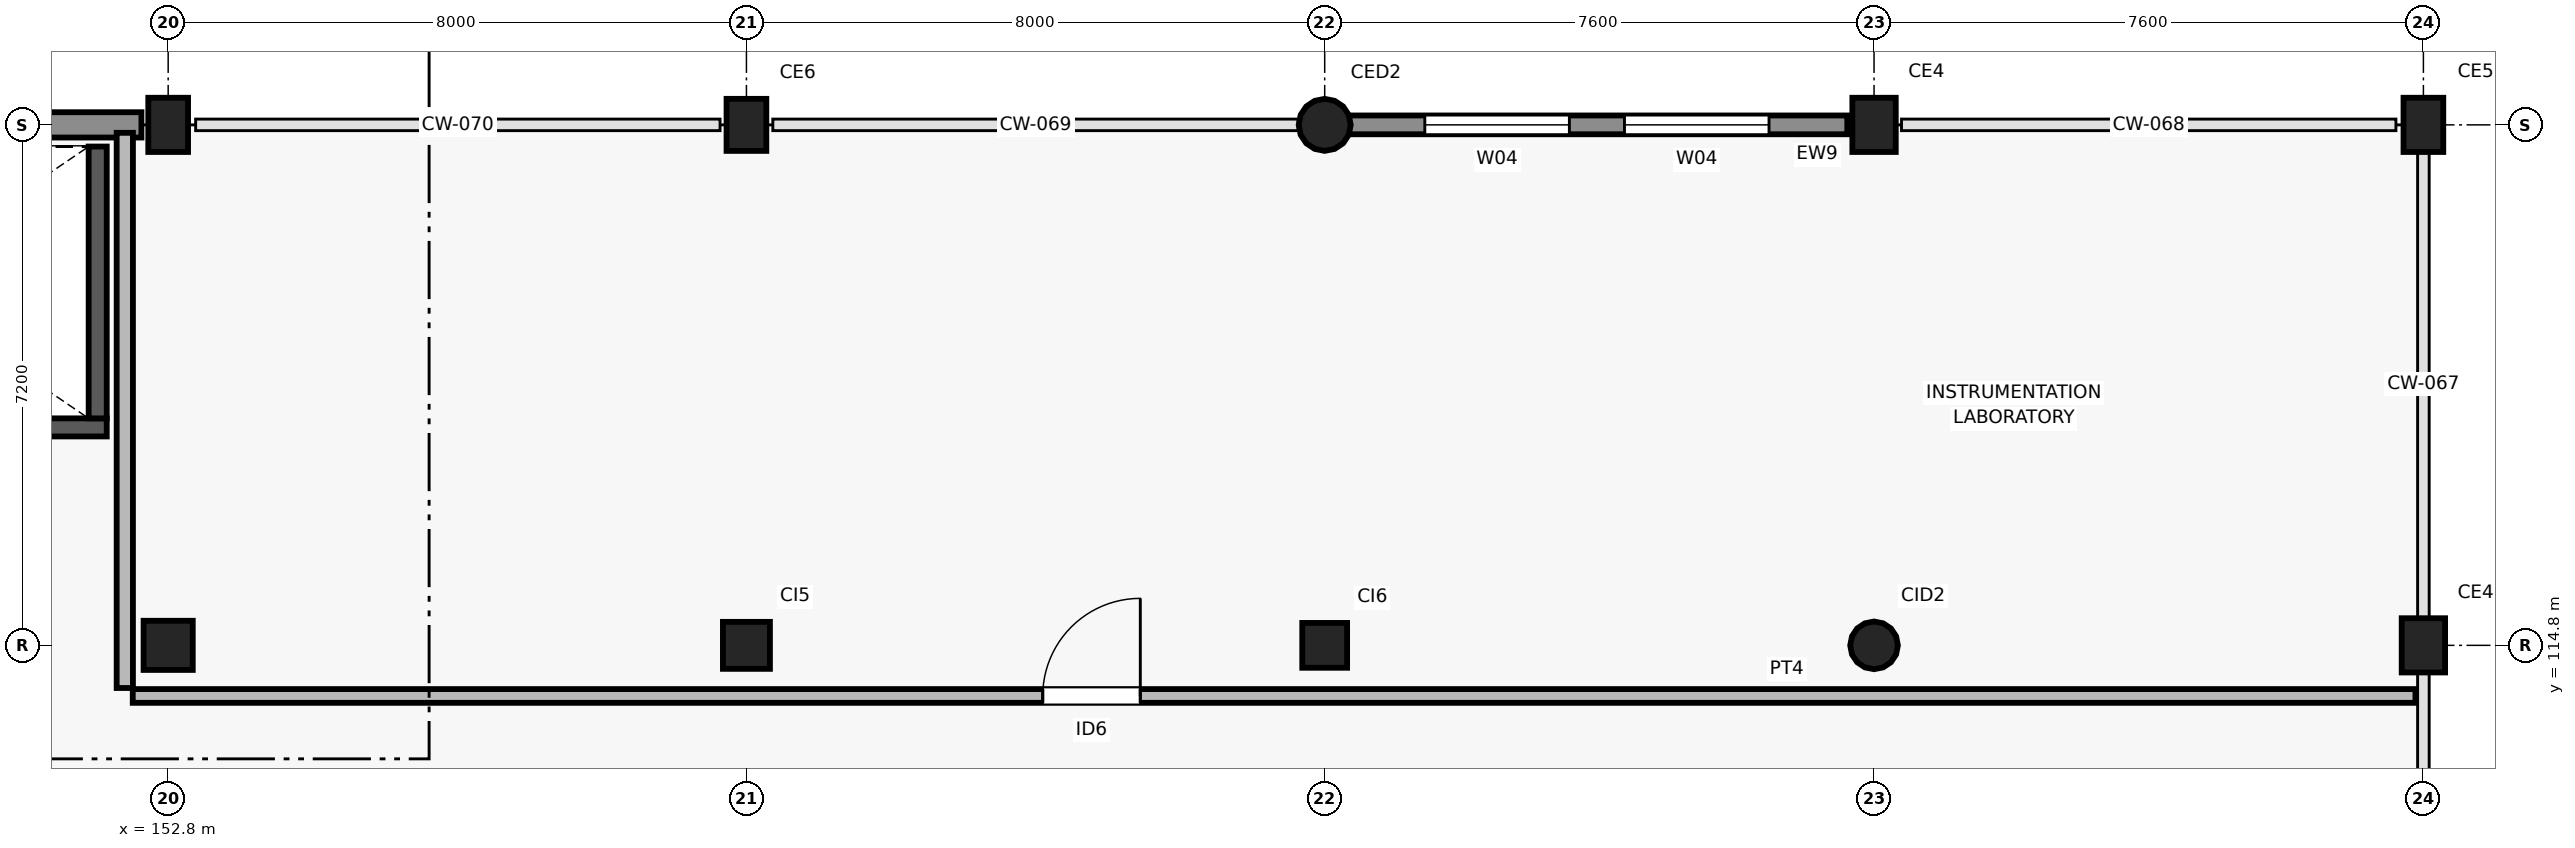
"""IFC4 building model, lengths in metres.
Left out: names, types, materials, properties, quantities, classifications, styles, units other than length and angle.
Written with IfcOpenShell. Run it as: python <this file> out.ifc"""

import sys

from ifc_helpers import new_model, si_unit, direction, frame, frame_2d, origin, origin_2d, place, context, subcontext, project, spatial, rectangle, circle, extrude, element, fill, save


model = new_model("IFC4")
c1 = context("Model", 3, precision=1e-05, world=origin(), true_north=direction((0.0, 1.0)))
c2 = subcontext(c1, "Body", "Model", "MODEL_VIEW")
j1 = project(units=[si_unit("LENGTHUNIT", "METRE"), si_unit("PLANEANGLEUNIT", "RADIAN")], contexts=[c1])
p1 = place(None, origin())
s1 = spatial("IfcSite", under=j1, at=p1, CompositionType="ELEMENT")
p2 = place(p1, origin())
s2 = spatial("IfcBuilding", under=s1, at=p2, CompositionType="ELEMENT")
p3 = place(p2, frame((0.0, 0.0, 4.5)))
s3 = spatial("IfcBuildingStorey", under=s2, at=p3, CompositionType="ELEMENT", Elevation=4.5)
p4 = place(p3, frame((152.8, 114.8, 0.0), z_axis=(0.0, 0.0, 1.0), x_axis=(1.0, 0.0, 0.0)))
e1 = element("IfcColumn", 1, at=p4, inside=s3, PredefinedType="COLUMN", context=c2, shape_type="SweptSolid", body=[
    extrude(rectangle(XDim=0.68, YDim=0.68, at=origin_2d()), origin(), (0.0, 0.0, 1.0), 4.5),
])
p5 = place(p3, frame((152.8, 122.0, 0.0), z_axis=(0.0, 0.0, 1.0), x_axis=(1.0, 0.0, 0.0)))
e2 = element("IfcColumn", 2, at=p5, inside=s3, PredefinedType="COLUMN", context=c2, shape_type="SweptSolid", body=[
    extrude(rectangle(XDim=0.75, YDim=0.55, at=origin_2d()), origin(), (0.0, 0.0, 1.0), 4.5),
])
p6 = place(p3, frame((160.8, 114.8, 0.0), z_axis=(0.0, 0.0, 1.0), x_axis=(1.0, 0.0, 0.0)))
e3 = element("IfcColumn", 3, at=p6, inside=s3, PredefinedType="COLUMN", context=c2, shape_type="SweptSolid", body=[
    extrude(rectangle(XDim=0.65, YDim=0.65, at=origin_2d()), origin(), (0.0, 0.0, 1.0), 4.5),
])
p7 = place(p3, frame((160.8, 122.0, 0.0), z_axis=(0.0, 0.0, 1.0), x_axis=(1.0, 0.0, 0.0)))
e4 = element("IfcColumn", 4, at=p7, inside=s3, PredefinedType="COLUMN", context=c2, shape_type="SweptSolid", body=[
    extrude(rectangle(XDim=0.72, YDim=0.55, at=origin_2d()), origin(), (0.0, 0.0, 1.0), 4.5),
])
p8 = place(p3, frame((168.8, 114.8, 0.0), z_axis=(0.0, 0.0, 1.0), x_axis=(1.0, 0.0, 0.0)))
e5 = element("IfcColumn", 5, at=p8, inside=s3, PredefinedType="COLUMN", context=c2, shape_type="SweptSolid", body=[
    extrude(rectangle(XDim=0.62, YDim=0.62, at=origin_2d()), origin(), (0.0, 0.0, 1.0), 4.5),
])
p9 = place(p3, frame((168.8, 122.0, 0.0), z_axis=(0.0, 0.0, 1.0), x_axis=(1.0, 0.0, 0.0)))
e6 = element("IfcColumn", 6, at=p9, inside=s3, PredefinedType="COLUMN", context=c2, shape_type="SweptSolid", body=[
    extrude(circle(Radius=0.36, at=origin_2d()), origin(), (0.0, 0.0, 1.0), 4.5),
])
p10 = place(p3, frame((176.4, 114.8, 0.0), z_axis=(0.0, 0.0, 1.0), x_axis=(1.0, 0.0, 0.0)))
e7 = element("IfcColumn", 7, at=p10, inside=s3, PredefinedType="COLUMN", context=c2, shape_type="SweptSolid", body=[
    extrude(circle(Radius=0.33, at=origin_2d()), origin(), (0.0, 0.0, 1.0), 4.5),
])
for number, where, z_axis, x_axis in (
    (8, (176.4, 122.0, 0.0), (0.0, 0.0, 1.0), (1.0, 0.0, 0.0)),
    (9, (184.0, 114.8, 0.0), (0.0, 0.0, 1.0), (1.0, 0.0, 0.0)),
):
    element("IfcColumn", number, at=place(p3, frame(where, z_axis=z_axis, x_axis=x_axis)), inside=s3, PredefinedType="COLUMN", context=c2, shape_type="SweptSolid", body=[
        extrude(rectangle(XDim=0.75, YDim=0.6, at=origin_2d()), origin(), (0.0, 0.0, 1.0), 4.5),
    ])
p11 = place(p3, frame((184.0, 122.0, 0.0), z_axis=(0.0, 0.0, 1.0), x_axis=(1.0, 0.0, 0.0)))
e10 = element("IfcColumn", 10, at=p11, inside=s3, PredefinedType="COLUMN", context=c2, shape_type="SweptSolid", body=[
    extrude(rectangle(XDim=0.75, YDim=0.55, at=origin_2d()), origin(), (0.0, 0.0, 1.0), 4.5),
])
p12 = place(p3, frame((176.03, 122.0, 0.0), z_axis=(0.0, 0.0, 1.0), x_axis=(-1.0, 0.0, 0.0)))
e11 = element("IfcWall", 11, at=p12, inside=s3, PredefinedType="SOLIDWALL", context=c2, shape_type="SweptSolid", body=[
    extrude(rectangle(XDim=6.928, YDim=0.26, at=frame_2d((3.464, 0.0))), origin(), (0.0, 0.0, 1.0), 3.57),
])
p13 = place(p12, frame((1.083, 0.0, 0.9)))
e12 = element("IfcOpeningElement", 12, at=p13, cuts=e11, PredefinedType="OPENING", context=c2, shape_type="SweptSolid", body=[
    extrude(rectangle(XDim=2.0, YDim=1.8, at=frame_2d((1.0, 0.9))), frame((0.0, 0.14, 0.0), z_axis=(0.0, -1.0, 0.0), x_axis=(1.0, 0.0, 0.0)), (0.0, 0.0, 1.0), 0.28),
])
p14 = place(p12, frame((3.845, 0.0, 0.9)))
e13 = element("IfcOpeningElement", 13, at=p14, cuts=e11, PredefinedType="OPENING", context=c2, shape_type="SweptSolid", body=[
    extrude(rectangle(XDim=2.0, YDim=1.8, at=frame_2d((1.0, 0.9))), frame((0.0, 0.14, 0.0), z_axis=(0.0, -1.0, 0.0), x_axis=(1.0, 0.0, 0.0)), (0.0, 0.0, 1.0), 0.28),
])
p15 = place(p3, frame((152.43, 122.0, 0.0), z_axis=(0.0, 0.0, 1.0), x_axis=(-1.0, 0.0, 0.0)))
e14 = element("IfcWall", 14, at=p15, inside=s3, PredefinedType="SOLIDWALL", context=c2, shape_type="SweptSolid", body=[
    extrude(rectangle(XDim=7.26, YDim=0.35, at=frame_2d((3.63, 0.0))), origin(), (0.0, 0.0, 1.0), 4.22),
])
p16 = place(p3, frame((144.05, 117.815, 0.0), z_axis=(0.0, 0.0, 1.0), x_axis=(1.0, 0.0, 0.0)))
e15 = element("IfcWall", 15, at=p16, inside=s3, PredefinedType="SHEAR", context=c2, shape_type="SweptSolid", body=[
    extrude(rectangle(XDim=7.9, YDim=0.25, at=frame_2d((3.95, 0.0))), origin(), (0.0, 0.0, 1.0), 4.22),
])
p17 = place(p16, frame((0.5, 0.0, 0.0)))
e16 = element("IfcOpeningElement", 16, at=p17, cuts=e15, PredefinedType="OPENING", context=c2, shape_type="SweptSolid", body=[
    extrude(rectangle(XDim=1.25, YDim=2.2, at=frame_2d((0.625, 1.1))), frame((0.0, 0.135, 0.0), z_axis=(0.0, -1.0, 0.0), x_axis=(1.0, 0.0, 0.0)), (0.0, 0.0, 1.0), 0.27),
])
p18 = place(p3, frame((151.825, 117.94, 0.0), z_axis=(0.0, 0.0, 1.0), x_axis=(0.0, 1.0, 0.0)))
e17 = element("IfcWall", 17, at=p18, inside=s3, PredefinedType="SHEAR", context=c2, shape_type="SweptSolid", body=[
    extrude(rectangle(XDim=3.76, YDim=0.25, at=frame_2d((1.88, 0.0))), origin(), (0.0, 0.0, 1.0), 4.22),
])
p19 = place(p3, frame((152.31, 114.1, 0.0), z_axis=(0.0, 0.0, 1.0), x_axis=(1.0, 0.0, 0.0)))
e18 = element("IfcWall", 18, at=p19, inside=s3, PredefinedType="PARTITIONING", context=c2, shape_type="SweptSolid", body=[
    extrude(rectangle(XDim=31.58, YDim=0.19, at=frame_2d((15.79, 0.0))), origin(), (0.0, 0.0, 1.0), 4.2),
])
p20 = place(p19, frame((12.589, 0.0, 0.0)))
e19 = element("IfcOpeningElement", 19, at=p20, cuts=e18, PredefinedType="OPENING", context=c2, shape_type="SweptSolid", body=[
    extrude(rectangle(XDim=1.35, YDim=2.2, at=frame_2d((0.675, 1.1))), frame((0.0, 0.105, 0.0), z_axis=(0.0, -1.0, 0.0), x_axis=(1.0, 0.0, 0.0)), (0.0, 0.0, 1.0), 0.21),
])
p21 = place(p3, frame((152.2, 114.21, 0.0), z_axis=(0.0, 0.0, 1.0), x_axis=(0.0, 1.0, 0.0)))
e20 = element("IfcWall", 20, at=p21, inside=s3, PredefinedType="PARTITIONING", context=c2, shape_type="SweptSolid", body=[
    extrude(rectangle(XDim=7.68, YDim=0.225, at=frame_2d((3.84, 0.0))), origin(), (0.0, 0.0, 1.0), 4.2),
])
p22 = place(p13, origin())
e21 = element("IfcWindow", 21, at=p22, inside=s3, PartitioningType="SINGLE_PANEL", PredefinedType="WINDOW", context=c2, shape_type="SweptSolid", body=[
    extrude(rectangle(XDim=2.0, YDim=1.8, at=frame_2d((1.0, 0.9))), frame((0.0, 0.03, 0.0), z_axis=(0.0, -1.0, 0.0), x_axis=(1.0, 0.0, 0.0)), (0.0, 0.0, 1.0), 0.06),
])
fill(e12, e21)
p23 = place(p14, origin())
e22 = element("IfcWindow", 22, at=p23, inside=s3, PartitioningType="SINGLE_PANEL", PredefinedType="WINDOW", context=c2, shape_type="SweptSolid", body=[
    extrude(rectangle(XDim=2.0, YDim=1.8, at=frame_2d((1.0, 0.9))), frame((0.0, 0.03, 0.0), z_axis=(0.0, -1.0, 0.0), x_axis=(1.0, 0.0, 0.0)), (0.0, 0.0, 1.0), 0.06),
])
fill(e13, e22)
p24 = place(p20, origin())
e23 = element("IfcDoor", 23, at=p24, inside=s3, OperationType="SINGLE_SWING_RIGHT", PredefinedType="DOOR", context=c2, shape_type="SweptSolid", body=[
    extrude(rectangle(XDim=1.35, YDim=2.2, at=frame_2d((0.675, 1.1))), frame((0.0, 0.025, 0.0), z_axis=(0.0, -1.0, 0.0), x_axis=(1.0, 0.0, 0.0)), (0.0, 0.0, 1.0), 0.05),
])
fill(e19, e23)
save(model, sys.argv[1])
